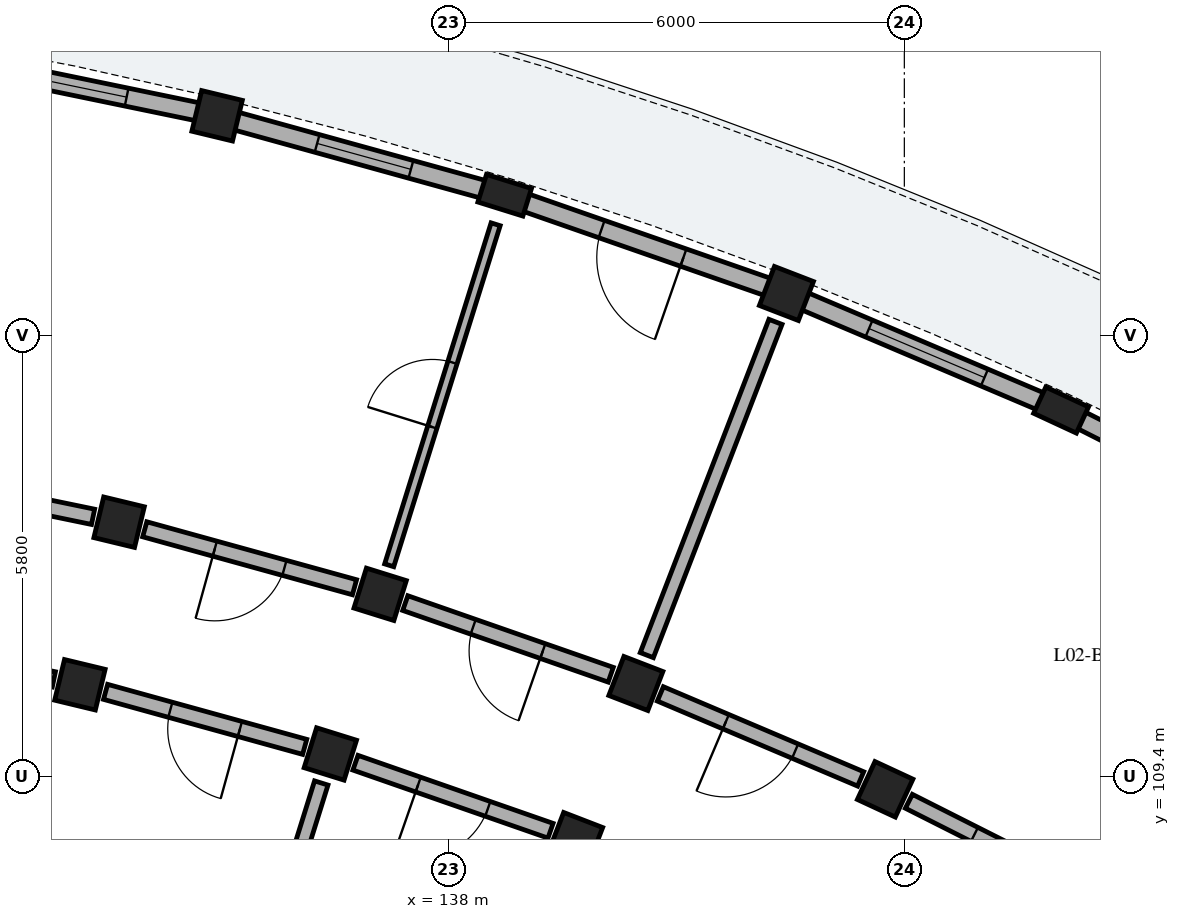
"""IFC4 building model, lengths in metres.
Left out: names, types, materials, properties, quantities, classifications, styles, units other than length and angle.
Written with IfcOpenShell. Run it as: python <this file> out.ifc"""

import sys

from ifc_helpers import new_model, si_unit, direction, frame, frame_2d, origin, origin_2d, place, context, subcontext, project, spatial, rectangle, extrude, element, fill, save


model = new_model("IFC4")
c1 = context("Model", 3, precision=1e-05, world=origin(), true_north=direction((0.0, 1.0)))
c2 = subcontext(c1, "Body", "Model", "MODEL_VIEW")
j1 = project(units=[si_unit("LENGTHUNIT", "METRE"), si_unit("PLANEANGLEUNIT", "RADIAN")], contexts=[c1])
p1 = place(None, origin())
s1 = spatial("IfcSite", under=j1, at=p1, CompositionType="ELEMENT")
p2 = place(p1, origin())
s2 = spatial("IfcBuilding", under=s1, at=p2, CompositionType="ELEMENT")
p3 = place(p2, frame((0.0, 0.0, 8.84)))
s3 = spatial("IfcBuildingStorey", under=s2, at=p3, CompositionType="ELEMENT", Elevation=8.84)
p4 = place(p3, frame((143.748, 109.23, 0.0), z_axis=(0.0, 0.0, 1.0), x_axis=(0.420859860775, 0.907125668024, 0.0)))
e1 = element("IfcColumn", 1, at=p4, inside=s3, PredefinedType="COLUMN", context=c2, shape_type="SweptSolid", body=[
    extrude(rectangle(XDim=0.55, YDim=0.55, at=origin_2d()), origin(), (0.0, 0.0, 1.0), 3.105),
])
p5 = place(p3, frame((146.062, 114.219, 0.0), z_axis=(0.0, 0.0, 1.0), x_axis=(0.420859860775, 0.907125668024, 0.0)))
e2 = element("IfcColumn", 2, at=p5, inside=s3, PredefinedType="PILASTER", context=c2, shape_type="SweptSolid", body=[
    extrude(rectangle(XDim=0.38, YDim=0.62, at=origin_2d()), origin(), (0.0, 0.0, 1.0), 3.105),
])
for number, where, z_axis, x_axis in (
    (3, (139.675, 108.57, 0.0), (0.0, 0.0, 1.0), (0.36, 0.933, 0.0)),
    (4, (140.468, 110.622, 0.0), (0.0, 0.0, 1.0), (0.36, 0.933, 0.0)),
    (5, (142.448, 115.753, 0.0), (0.0, 0.0, 1.0), (0.36, 0.933, 0.0)),
    (6, (136.448, 109.695, 0.0), (0.0, 0.0, 1.0), (0.298, 0.955, 0.0)),
    (7, (137.103, 111.795, 0.0), (0.0, 0.0, 1.0), (0.298, 0.955, 0.0)),
):
    element("IfcColumn", number, at=place(p3, frame(where, z_axis=z_axis, x_axis=x_axis)), inside=s3, PredefinedType="COLUMN", context=c2, shape_type="SweptSolid", body=[
        extrude(rectangle(XDim=0.55, YDim=0.55, at=origin_2d()), origin(), (0.0, 0.0, 1.0), 3.105),
    ])
p6 = place(p3, frame((138.742, 117.046, 0.0), z_axis=(0.0, 0.0, 1.0), x_axis=(0.297930225503, 0.954587649581, 0.0)))
e8 = element("IfcColumn", 8, at=p6, inside=s3, PredefinedType="PILASTER", context=c2, shape_type="SweptSolid", body=[
    extrude(rectangle(XDim=0.38, YDim=0.62, at=origin_2d()), origin(), (0.0, 0.0, 1.0), 3.105),
])
for number, where, z_axis, x_axis in (
    (9, (133.153, 110.606, 0.0), (0.0, 0.0, 1.0), (0.234, 0.972, 0.0)),
    (10, (133.669, 112.744, 0.0), (0.0, 0.0, 1.0), (0.234, 0.972, 0.0)),
    (11, (134.958, 118.091, 0.0), (0.0, 0.0, 1.0), (0.234, 0.972, 0.0)),
):
    element("IfcColumn", number, at=place(p3, frame(where, z_axis=z_axis, x_axis=x_axis)), inside=s3, PredefinedType="COLUMN", context=c2, shape_type="SweptSolid", body=[
        extrude(rectangle(XDim=0.55, YDim=0.55, at=origin_2d()), origin(), (0.0, 0.0, 1.0), 3.105),
    ])
p7 = place(p3, frame((149.348, 112.561, 0.0), z_axis=(0.0, 0.0, 1.0), x_axis=(-0.892756700232, 0.450539092855, 0.0)))
e12 = element("IfcWall", 12, at=p7, inside=s3, PredefinedType="SOLIDWALL", context=c2, shape_type="SweptSolid", body=[
    extrude(rectangle(XDim=3.521, YDim=0.24, at=frame_2d((1.76, 0.0))), origin(), (0.0, 0.0, 1.0), 2.355),
])
p8 = place(p7, frame((1.01, 0.0, 0.35)))
e13 = element("IfcOpeningElement", 13, at=p8, cuts=e12, PredefinedType="OPENING", context=c2, shape_type="SweptSolid", body=[
    extrude(rectangle(XDim=1.5, YDim=1.7, at=frame_2d((0.75, 0.85))), frame((0.0, 0.13, 0.0), z_axis=(0.0, -1.0, 0.0), x_axis=(1.0, 0.0, 0.0)), (0.0, 0.0, 1.0), 0.26),
])
p9 = place(p3, frame((145.915, 114.282, 0.0), z_axis=(0.0, 0.0, 1.0), x_axis=(-0.920502438884, 0.390736816807, 0.0)))
e14 = element("IfcWall", 14, at=p9, inside=s3, PredefinedType="SOLIDWALL", context=c2, shape_type="SweptSolid", body=[
    extrude(rectangle(XDim=3.521, YDim=0.24, at=frame_2d((1.76, 0.0))), origin(), (0.0, 0.0, 1.0), 2.355),
])
p10 = place(p9, frame((0.935, 0.0, 0.35)))
e15 = element("IfcOpeningElement", 15, at=p10, cuts=e14, PredefinedType="OPENING", context=c2, shape_type="SweptSolid", body=[
    extrude(rectangle(XDim=1.65, YDim=1.8, at=frame_2d((0.825, 0.9))), frame((0.0, 0.13, 0.0), z_axis=(0.0, -1.0, 0.0), x_axis=(1.0, 0.0, 0.0)), (0.0, 0.0, 1.0), 0.26),
])
p11 = place(p3, frame((142.217, 115.834, 0.0), z_axis=(0.0, 0.0, 1.0), x_axis=(-0.944267366677, 0.329179495455, 0.0)))
e16 = element("IfcWall", 16, at=p11, inside=s3, PredefinedType="SOLIDWALL", context=c2, shape_type="SweptSolid", body=[
    extrude(rectangle(XDim=3.521, YDim=0.24, at=frame_2d((1.76, 0.0))), origin(), (0.0, 0.0, 1.0), 2.355),
])
p12 = place(p11, frame((1.19, 0.0, 0.0)))
e17 = element("IfcOpeningElement", 17, at=p12, cuts=e16, PredefinedType="OPENING", context=c2, shape_type="SweptSolid", body=[
    extrude(rectangle(XDim=1.14, YDim=2.16, at=frame_2d((0.57, 1.08))), frame((0.0, 0.13, 0.0), z_axis=(0.0, -1.0, 0.0), x_axis=(1.0, 0.0, 0.0)), (0.0, 0.0, 1.0), 0.26),
])
p13 = place(p3, frame((138.587, 117.088, 0.0), z_axis=(0.0, 0.0, 1.0), x_axis=(-0.963894473631, 0.266284516456, 0.0)))
e18 = element("IfcWall", 18, at=p13, inside=s3, PredefinedType="SOLIDWALL", context=c2, shape_type="SweptSolid", body=[
    extrude(rectangle(XDim=3.521, YDim=0.24, at=frame_2d((1.76, 0.0))), origin(), (0.0, 0.0, 1.0), 2.355),
])
p14 = place(p13, frame((1.12, 0.0, 0.55)))
e19 = element("IfcOpeningElement", 19, at=p14, cuts=e18, PredefinedType="OPENING", context=c2, shape_type="SweptSolid", body=[
    extrude(rectangle(XDim=1.28, YDim=1.52, at=frame_2d((0.64, 0.76))), frame((0.0, 0.13, 0.0), z_axis=(0.0, -1.0, 0.0), x_axis=(1.0, 0.0, 0.0)), (0.0, 0.0, 1.0), 0.26),
])
p15 = place(p3, frame((134.718, 118.141, 0.0), z_axis=(0.0, 0.0, 1.0), x_axis=(-0.979340051053, 0.202220336275, 0.0)))
e20 = element("IfcWall", 20, at=p15, inside=s3, PredefinedType="SOLIDWALL", context=c2, shape_type="SweptSolid", body=[
    extrude(rectangle(XDim=3.521, YDim=0.24, at=frame_2d((1.76, 0.0))), origin(), (0.0, 0.0, 1.0), 2.355),
])
p16 = place(p15, frame((0.97, 0.0, 0.35)))
e21 = element("IfcOpeningElement", 21, at=p16, cuts=e20, PredefinedType="OPENING", context=c2, shape_type="SweptSolid", body=[
    extrude(rectangle(XDim=1.58, YDim=1.68, at=frame_2d((0.79, 0.84))), frame((0.0, 0.13, 0.0), z_axis=(0.0, -1.0, 0.0), x_axis=(1.0, 0.0, 0.0)), (0.0, 0.0, 1.0), 0.26),
])
p17 = place(p3, frame((146.616, 107.782, 0.0), z_axis=(0.0, 0.0, 1.0), x_axis=(-0.89273239336, 0.450587254419, 0.0)))
e22 = element("IfcWall", 22, at=p17, inside=s3, PredefinedType="PARTITIONING", context=c2, shape_type="SweptSolid", body=[
    extrude(rectangle(XDim=2.863, YDim=0.205, at=frame_2d((1.432, 0.0))), origin(), (0.0, 0.0, 1.0), 2.37),
])
p18 = place(p17, frame((0.967, 0.0, 0.0)))
e23 = element("IfcOpeningElement", 23, at=p18, cuts=e22, PredefinedType="OPENING", context=c2, shape_type="SweptSolid", body=[
    extrude(rectangle(XDim=0.93, YDim=2.12, at=frame_2d((0.465, 1.06))), frame((0.0, 0.113, 0.0), z_axis=(0.0, -1.0, 0.0), x_axis=(1.0, 0.0, 0.0)), (0.0, 0.0, 1.0), 0.225),
])
p19 = place(p3, frame((143.425, 109.367, 0.0), z_axis=(0.0, 0.0, 1.0), x_axis=(-0.920511160294, 0.390716270168, 0.0)))
e24 = element("IfcWall", 24, at=p19, inside=s3, PredefinedType="PARTITIONING", context=c2, shape_type="SweptSolid", body=[
    extrude(rectangle(XDim=2.863, YDim=0.205, at=frame_2d((1.432, 0.0))), origin(), (0.0, 0.0, 1.0), 2.37),
])
p20 = place(p19, frame((0.937, 0.0, 0.0)))
e25 = element("IfcOpeningElement", 25, at=p20, cuts=e24, PredefinedType="OPENING", context=c2, shape_type="SweptSolid", body=[
    extrude(rectangle(XDim=0.99, YDim=2.16, at=frame_2d((0.495, 1.08))), frame((0.0, 0.113, 0.0), z_axis=(0.0, -1.0, 0.0), x_axis=(1.0, 0.0, 0.0)), (0.0, 0.0, 1.0), 0.225),
])
p21 = place(p3, frame((140.612, 110.996, 0.0), z_axis=(0.0, 0.0, 1.0), x_axis=(0.360186633854, 0.932880264982, 0.0)))
e26 = element("IfcWall", 26, at=p21, inside=s3, PredefinedType="PARTITIONING", context=c2, shape_type="SweptSolid", body=[
    extrude(rectangle(XDim=4.7, YDim=0.185, at=frame_2d((2.35, 0.0))), origin(), (0.0, 0.0, 1.0), 2.37),
])
p22 = place(p3, frame((140.137, 110.738, 0.0), z_axis=(0.0, 0.0, 1.0), x_axis=(-0.944253820929, 0.329218349522, 0.0)))
e27 = element("IfcWall", 27, at=p22, inside=s3, PredefinedType="PARTITIONING", context=c2, shape_type="SweptSolid", body=[
    extrude(rectangle(XDim=2.863, YDim=0.205, at=frame_2d((1.432, 0.0))), origin(), (0.0, 0.0, 1.0), 2.37),
])
p23 = place(p22, frame((0.947, 0.0, 0.0)))
e28 = element("IfcOpeningElement", 28, at=p23, cuts=e27, PredefinedType="OPENING", context=c2, shape_type="SweptSolid", body=[
    extrude(rectangle(XDim=0.97, YDim=2.15, at=frame_2d((0.485, 1.075))), frame((0.0, 0.113, 0.0), z_axis=(0.0, -1.0, 0.0), x_axis=(1.0, 0.0, 0.0)), (0.0, 0.0, 1.0), 0.225),
])
p24 = place(p3, frame((139.345, 108.685, 0.0), z_axis=(0.0, 0.0, 1.0), x_axis=(-0.944265123647, 0.329185929627, 0.0)))
e29 = element("IfcWall", 29, at=p24, inside=s3, PredefinedType="PARTITIONING", context=c2, shape_type="SweptSolid", body=[
    extrude(rectangle(XDim=2.718, YDim=0.205, at=frame_2d((1.359, 0.0))), origin(), (0.0, 0.0, 1.0), 2.37),
])
p25 = place(p24, frame((0.874, 0.0, 0.0)))
e30 = element("IfcOpeningElement", 30, at=p25, cuts=e29, PredefinedType="OPENING", context=c2, shape_type="SweptSolid", body=[
    extrude(rectangle(XDim=0.97, YDim=2.15, at=frame_2d((0.485, 1.075))), frame((0.0, 0.113, 0.0), z_axis=(0.0, -1.0, 0.0), x_axis=(1.0, 0.0, 0.0)), (0.0, 0.0, 1.0), 0.225),
])
p26 = place(p3, frame((137.222, 112.177, 0.0), z_axis=(0.0, 0.0, 1.0), x_axis=(0.297905254614, 0.954595442726, 0.0)))
e31 = element("IfcWall", 31, at=p26, inside=s3, PredefinedType="PARTITIONING", context=c2, shape_type="SweptSolid", body=[
    extrude(rectangle(XDim=4.7, YDim=0.125, at=frame_2d((2.35, 0.0))), origin(), (0.0, 0.0, 1.0), 2.37),
])
p27 = place(p26, frame((1.905, 0.0, 0.0)))
e32 = element("IfcOpeningElement", 32, at=p27, cuts=e31, PredefinedType="OPENING", context=c2, shape_type="SweptSolid", body=[
    extrude(rectangle(XDim=0.89, YDim=2.1, at=frame_2d((0.445, 1.05))), frame((0.0, 0.073, 0.0), z_axis=(0.0, -1.0, 0.0), x_axis=(1.0, 0.0, 0.0)), (0.0, 0.0, 1.0), 0.145),
])
p28 = place(p3, frame((134.362, 103.013, 0.0), z_axis=(0.0, 0.0, 1.0), x_axis=(0.2979590431, 0.954578655028, 0.0)))
e33 = element("IfcWall", 33, at=p28, inside=s3, PredefinedType="PARTITIONING", context=c2, shape_type="SweptSolid", body=[
    extrude(rectangle(XDim=6.6, YDim=0.185, at=frame_2d((3.3, 0.0))), origin(), (0.0, 0.0, 1.0), 2.37),
])
p29 = place(p3, frame((136.766, 111.889, 0.0), z_axis=(0.0, 0.0, 1.0), x_axis=(-0.963890789093, 0.266297853356, 0.0)))
e34 = element("IfcWall", 34, at=p29, inside=s3, PredefinedType="PARTITIONING", context=c2, shape_type="SweptSolid", body=[
    extrude(rectangle(XDim=2.863, YDim=0.205, at=frame_2d((1.432, 0.0))), origin(), (0.0, 0.0, 1.0), 2.37),
])
p30 = place(p29, frame((0.957, 0.0, 0.0)))
e35 = element("IfcOpeningElement", 35, at=p30, cuts=e34, PredefinedType="OPENING", context=c2, shape_type="SweptSolid", body=[
    extrude(rectangle(XDim=0.95, YDim=2.13, at=frame_2d((0.475, 1.065))), frame((0.0, 0.113, 0.0), z_axis=(0.0, -1.0, 0.0), x_axis=(1.0, 0.0, 0.0)), (0.0, 0.0, 1.0), 0.225),
])
p31 = place(p3, frame((136.11, 109.789, 0.0), z_axis=(0.0, 0.0, 1.0), x_axis=(-0.96388375821, 0.266323301006, 0.0)))
e36 = element("IfcWall", 36, at=p31, inside=s3, PredefinedType="PARTITIONING", context=c2, shape_type="SweptSolid", body=[
    extrude(rectangle(XDim=2.718, YDim=0.205, at=frame_2d((1.359, 0.0))), origin(), (0.0, 0.0, 1.0), 2.37),
])
p32 = place(p31, frame((0.884, 0.0, 0.0)))
e37 = element("IfcOpeningElement", 37, at=p32, cuts=e36, PredefinedType="OPENING", context=c2, shape_type="SweptSolid", body=[
    extrude(rectangle(XDim=0.95, YDim=2.13, at=frame_2d((0.475, 1.065))), frame((0.0, 0.113, 0.0), z_axis=(0.0, -1.0, 0.0), x_axis=(1.0, 0.0, 0.0)), (0.0, 0.0, 1.0), 0.225),
])
p33 = place(p3, frame((133.326, 112.815, 0.0), z_axis=(0.0, 0.0, 1.0), x_axis=(-0.979348418612, 0.202179808492, 0.0)))
e38 = element("IfcWall", 38, at=p33, inside=s3, PredefinedType="PARTITIONING", context=c2, shape_type="SweptSolid", body=[
    extrude(rectangle(XDim=2.863, YDim=0.205, at=frame_2d((1.432, 0.0))), origin(), (0.0, 0.0, 1.0), 2.37),
])
p34 = place(p33, frame((0.967, 0.0, 0.0)))
e39 = element("IfcOpeningElement", 39, at=p34, cuts=e38, PredefinedType="OPENING", context=c2, shape_type="SweptSolid", body=[
    extrude(rectangle(XDim=0.93, YDim=2.12, at=frame_2d((0.465, 1.06))), frame((0.0, 0.113, 0.0), z_axis=(0.0, -1.0, 0.0), x_axis=(1.0, 0.0, 0.0)), (0.0, 0.0, 1.0), 0.225),
])
p35 = place(p3, frame((132.81, 110.677, 0.0), z_axis=(0.0, 0.0, 1.0), x_axis=(-0.979349423541, 0.202174940608, 0.0)))
e40 = element("IfcWall", 40, at=p35, inside=s3, PredefinedType="PARTITIONING", context=c2, shape_type="SweptSolid", body=[
    extrude(rectangle(XDim=2.718, YDim=0.205, at=frame_2d((1.359, 0.0))), origin(), (0.0, 0.0, 1.0), 2.37),
])
p36 = place(p35, frame((0.894, 0.0, 0.0)))
e41 = element("IfcOpeningElement", 41, at=p36, cuts=e40, PredefinedType="OPENING", context=c2, shape_type="SweptSolid", body=[
    extrude(rectangle(XDim=0.93, YDim=2.12, at=frame_2d((0.465, 1.06))), frame((0.0, 0.113, 0.0), z_axis=(0.0, -1.0, 0.0), x_axis=(1.0, 0.0, 0.0)), (0.0, 0.0, 1.0), 0.225),
])
p37 = place(p10, origin())
e42 = element("IfcWindow", 42, at=p37, inside=s3, PartitioningType="SINGLE_PANEL", PredefinedType="WINDOW", context=c2, shape_type="SweptSolid", body=[
    extrude(rectangle(XDim=1.65, YDim=1.8, at=frame_2d((0.825, 0.9))), frame((0.0, 0.03, 0.0), z_axis=(0.0, -1.0, 0.0), x_axis=(1.0, 0.0, 0.0)), (0.0, 0.0, 1.0), 0.06),
])
fill(e15, e42)
p38 = place(p12, origin())
e43 = element("IfcDoor", 43, at=p38, inside=s3, OperationType="SINGLE_SWING_LEFT", PredefinedType="DOOR", context=c2, shape_type="SweptSolid", body=[
    extrude(rectangle(XDim=1.14, YDim=2.16, at=frame_2d((0.57, 1.08))), frame((0.0, 0.025, 0.0), z_axis=(0.0, -1.0, 0.0), x_axis=(1.0, 0.0, 0.0)), (0.0, 0.0, 1.0), 0.05),
])
fill(e17, e43)
p39 = place(p14, origin())
e44 = element("IfcWindow", 44, at=p39, inside=s3, PartitioningType="SINGLE_PANEL", PredefinedType="WINDOW", context=c2, shape_type="SweptSolid", body=[
    extrude(rectangle(XDim=1.28, YDim=1.52, at=frame_2d((0.64, 0.76))), frame((0.0, 0.03, 0.0), z_axis=(0.0, -1.0, 0.0), x_axis=(1.0, 0.0, 0.0)), (0.0, 0.0, 1.0), 0.06),
])
fill(e19, e44)
p40 = place(p16, origin())
e45 = element("IfcWindow", 45, at=p40, inside=s3, PartitioningType="SINGLE_PANEL", PredefinedType="WINDOW", context=c2, shape_type="SweptSolid", body=[
    extrude(rectangle(XDim=1.58, YDim=1.68, at=frame_2d((0.79, 0.84))), frame((0.0, 0.03, 0.0), z_axis=(0.0, -1.0, 0.0), x_axis=(1.0, 0.0, 0.0)), (0.0, 0.0, 1.0), 0.06),
])
fill(e21, e45)
p41 = place(p18, origin())
e46 = element("IfcDoor", 46, at=p41, inside=s3, OperationType="SINGLE_SWING_LEFT", PredefinedType="DOOR", context=c2, shape_type="SweptSolid", body=[
    extrude(rectangle(XDim=0.93, YDim=2.12, at=frame_2d((0.465, 1.06))), frame((0.0, 0.025, 0.0), z_axis=(0.0, -1.0, 0.0), x_axis=(1.0, 0.0, 0.0)), (0.0, 0.0, 1.0), 0.05),
])
fill(e23, e46)
p42 = place(p20, origin())
e47 = element("IfcDoor", 47, at=p42, inside=s3, OperationType="SINGLE_SWING_RIGHT", PredefinedType="DOOR", context=c2, shape_type="SweptSolid", body=[
    extrude(rectangle(XDim=0.99, YDim=2.16, at=frame_2d((0.495, 1.08))), frame((0.0, 0.025, 0.0), z_axis=(0.0, -1.0, 0.0), x_axis=(1.0, 0.0, 0.0)), (0.0, 0.0, 1.0), 0.05),
])
fill(e25, e47)
p43 = place(p23, origin())
e48 = element("IfcDoor", 48, at=p43, inside=s3, OperationType="SINGLE_SWING_LEFT", PredefinedType="DOOR", context=c2, shape_type="SweptSolid", body=[
    extrude(rectangle(XDim=0.97, YDim=2.15, at=frame_2d((0.485, 1.075))), frame((0.0, 0.025, 0.0), z_axis=(0.0, -1.0, 0.0), x_axis=(1.0, 0.0, 0.0)), (0.0, 0.0, 1.0), 0.05),
])
fill(e28, e48)
p44 = place(p25, origin())
e49 = element("IfcDoor", 49, at=p44, inside=s3, OperationType="SINGLE_SWING_RIGHT", PredefinedType="DOOR", context=c2, shape_type="SweptSolid", body=[
    extrude(rectangle(XDim=0.97, YDim=2.15, at=frame_2d((0.485, 1.075))), frame((0.0, 0.025, 0.0), z_axis=(0.0, -1.0, 0.0), x_axis=(1.0, 0.0, 0.0)), (0.0, 0.0, 1.0), 0.05),
])
fill(e30, e49)
p45 = place(p27, origin())
e50 = element("IfcDoor", 50, at=p45, inside=s3, OperationType="SINGLE_SWING_LEFT", PredefinedType="DOOR", context=c2, shape_type="SweptSolid", body=[
    extrude(rectangle(XDim=0.89, YDim=2.1, at=frame_2d((0.445, 1.05))), frame((0.0, 0.025, 0.0), z_axis=(0.0, -1.0, 0.0), x_axis=(1.0, 0.0, 0.0)), (0.0, 0.0, 1.0), 0.05),
])
fill(e32, e50)
p46 = place(p30, origin())
e51 = element("IfcDoor", 51, at=p46, inside=s3, OperationType="SINGLE_SWING_RIGHT", PredefinedType="DOOR", context=c2, shape_type="SweptSolid", body=[
    extrude(rectangle(XDim=0.95, YDim=2.13, at=frame_2d((0.475, 1.065))), frame((0.0, 0.025, 0.0), z_axis=(0.0, -1.0, 0.0), x_axis=(1.0, 0.0, 0.0)), (0.0, 0.0, 1.0), 0.05),
])
fill(e35, e51)
p47 = place(p32, origin())
e52 = element("IfcDoor", 52, at=p47, inside=s3, OperationType="SINGLE_SWING_LEFT", PredefinedType="DOOR", context=c2, shape_type="SweptSolid", body=[
    extrude(rectangle(XDim=0.95, YDim=2.13, at=frame_2d((0.475, 1.065))), frame((0.0, 0.025, 0.0), z_axis=(0.0, -1.0, 0.0), x_axis=(1.0, 0.0, 0.0)), (0.0, 0.0, 1.0), 0.05),
])
fill(e37, e52)
save(model, sys.argv[1])
